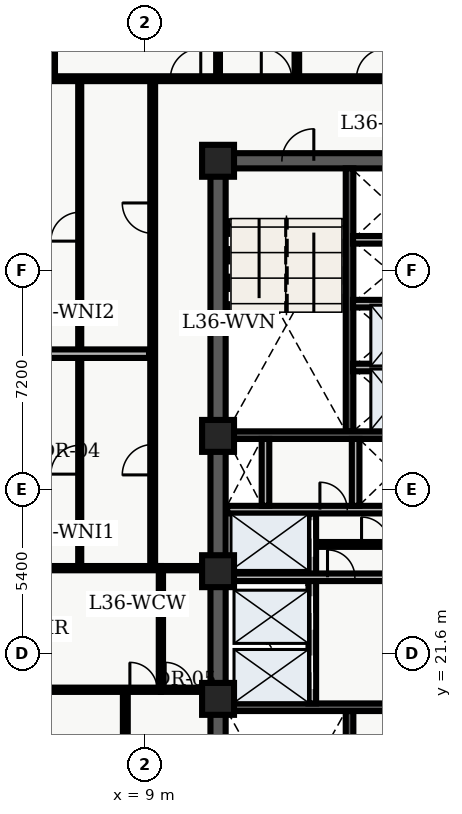
"""IFC4 building model, lengths in metres.
Left out: names, types, materials, properties, quantities, classifications, styles, units other than length and angle.
Written with IfcOpenShell. Run it as: python <this file> out.ifc"""

import sys

from ifc_helpers import new_model, entity, si_unit, converted_unit, direction, frame, origin_with_axes, origin_2d_with_axis, place, context, subcontext, project, spatial, polyline, rectangle, outline, extrude, element, fill, save


model = new_model("IFC4")
c1 = context("Model", 3, precision=1e-05, world=origin_with_axes(), true_north=direction((0.0, 1.0)))
c2 = subcontext(c1, "Body", "Model", "MODEL_VIEW")
j1 = project(units=[si_unit("LENGTHUNIT", "METRE"), converted_unit("PLANEANGLEUNIT", "DEGREE", entity("IfcPlaneAngleMeasure", 0.017), si_unit("PLANEANGLEUNIT", "RADIAN"), dimensions=[0, 0, 0, 0, 0, 0, 0])], contexts=[c1])
p1 = place(None, origin_with_axes())
s1 = spatial("IfcSite", under=j1, at=p1, CompositionType="ELEMENT")
p2 = place(p1, origin_with_axes())
s2 = spatial("IfcBuilding", under=s1, at=p2, CompositionType="ELEMENT")
p3 = place(p2, frame((0.0, 0.0, 148.5), z_axis=(0.0, 0.0, 1.0), x_axis=(1.0, 0.0, 0.0)))
s3 = spatial("IfcBuildingStorey", under=s2, at=p3, CompositionType="ELEMENT", Elevation=148.5)
p4 = place(p3, frame((11.4, 10.8, 0.0), z_axis=(0.0, 0.0, 1.0), x_axis=(0.0, 1.0, 0.0)))
e1 = element("IfcWall", 1, at=p4, inside=s3, PredefinedType="SHEAR", context=c2, shape_type="SweptSolid", body=[
    extrude(outline(polyline([(0.0, -0.25), (27.0, -0.25), (27.0, 0.25), (0.0, 0.25), (0.0, -0.25)])), origin_with_axes(), (0.0, 0.0, 1.0), 3.66),
])
p5 = place(p3, frame((11.4, 37.8, 0.0), z_axis=(0.0, 0.0, 1.0), x_axis=(1.0, 0.0, 0.0)))
e2 = element("IfcWall", 2, at=p5, inside=s3, PredefinedType="SHEAR", context=c2, shape_type="SweptSolid", body=[
    extrude(outline(polyline([(0.0, -0.25), (7.2, -0.25), (7.2, 0.25), (0.0, 0.25), (0.0, -0.25)])), origin_with_axes(), (0.0, 0.0, 1.0), 3.66),
])
p6 = place(p5, frame((2.625, 0.0, 0.0), z_axis=(0.0, 0.0, 1.0), x_axis=(1.0, 0.0, 0.0)))
e3 = element("IfcOpeningElement", 3, at=p6, cuts=e2, PredefinedType="OPENING", context=c2, shape_type="SweptSolid", body=[
    extrude(rectangle(XDim=1.05, YDim=0.52, at=origin_2d_with_axis()), origin_with_axes(), (0.0, 0.0, 1.0), 2.15),
])
p7 = place(p3, frame((15.725, 11.05, 0.0), z_axis=(0.0, 0.0, 1.0), x_axis=(0.0, 1.0, 0.0)))
e4 = element("IfcWall", 4, at=p7, inside=s3, PredefinedType="SHEAR", context=c2, shape_type="SweptSolid", body=[
    extrude(outline(polyline([(0.0, -0.125), (8.65, -0.125), (8.65, 0.125), (0.0, 0.125), (0.0, -0.125)])), origin_with_axes(), (0.0, 0.0, 1.0), 3.66),
])
p8 = place(p3, frame((11.65, 19.825, 0.0), z_axis=(0.0, 0.0, 1.0), x_axis=(1.0, 0.0, 0.0)))
e5 = element("IfcWall", 5, at=p8, inside=s3, PredefinedType="SHEAR", context=c2, shape_type="SweptSolid", body=[
    extrude(outline(polyline([(0.0, -0.125), (6.7, -0.125), (6.7, 0.125), (0.0, 0.125), (0.0, -0.125)])), origin_with_axes(), (0.0, 0.0, 1.0), 3.66),
])
p9 = place(p3, frame((15.725, 28.9, 0.0), z_axis=(0.0, 0.0, 1.0), x_axis=(0.0, 1.0, 0.0)))
e6 = element("IfcWall", 6, at=p9, inside=s3, PredefinedType="SHEAR", context=c2, shape_type="SweptSolid", body=[
    extrude(outline(polyline([(0.0, -0.125), (8.65, -0.125), (8.65, 0.125), (0.0, 0.125), (0.0, -0.125)])), origin_with_axes(), (0.0, 0.0, 1.0), 3.66),
])
p10 = place(p3, frame((11.65, 28.775, 0.0), z_axis=(0.0, 0.0, 1.0), x_axis=(1.0, 0.0, 0.0)))
e7 = element("IfcWall", 7, at=p10, inside=s3, PredefinedType="SHEAR", context=c2, shape_type="SweptSolid", body=[
    extrude(outline(polyline([(0.0, -0.125), (6.7, -0.125), (6.7, 0.125), (0.0, 0.125), (0.0, -0.125)])), origin_with_axes(), (0.0, 0.0, 1.0), 3.66),
])
p11 = place(p3, frame((14.5, 19.95, 0.0), z_axis=(0.0, 0.0, 1.0), x_axis=(0.0, 1.0, 0.0)))
e8 = element("IfcWall", 8, at=p11, inside=s3, PredefinedType="SOLIDWALL", context=c2, shape_type="SweptSolid", body=[
    extrude(outline(polyline([(0.0, -0.125), (6.25, -0.125), (6.25, 0.125), (0.0, 0.125), (0.0, -0.125)])), origin_with_axes(), (0.0, 0.0, 1.0), 2.7),
])
p12 = place(p11, frame((1.025, 0.0, 0.0), z_axis=(0.0, 0.0, 1.0), x_axis=(1.0, 0.0, 0.0)))
e9 = element("IfcOpeningElement", 9, at=p12, cuts=e8, PredefinedType="OPENING", context=c2, shape_type="SweptSolid", body=[
    extrude(rectangle(XDim=1.1, YDim=0.27, at=origin_2d_with_axis()), origin_with_axes(), (0.0, 0.0, 1.0), 2.15),
])
p13 = place(p11, frame((2.975, 0.0, 0.0), z_axis=(0.0, 0.0, 1.0), x_axis=(1.0, 0.0, 0.0)))
e10 = element("IfcOpeningElement", 10, at=p13, cuts=e8, PredefinedType="OPENING", context=c2, shape_type="SweptSolid", body=[
    extrude(rectangle(XDim=1.1, YDim=0.27, at=origin_2d_with_axis()), origin_with_axes(), (0.0, 0.0, 1.0), 2.15),
])
p14 = place(p11, frame((5.425, 0.0, 0.0), z_axis=(0.0, 0.0, 1.0), x_axis=(1.0, 0.0, 0.0)))
e11 = element("IfcOpeningElement", 11, at=p14, cuts=e8, PredefinedType="OPENING", context=c2, shape_type="SweptSolid", body=[
    extrude(rectangle(XDim=1.2, YDim=0.27, at=origin_2d_with_axis()), origin_with_axes(), (0.0, 0.0, 1.0), 2.15),
])
p15 = place(p3, frame((11.7, 24.1, 0.0), z_axis=(0.0, 0.0, 1.0), x_axis=(1.0, 0.0, 0.0)))
e12 = element("IfcWall", 12, at=p15, inside=s3, PredefinedType="SOLIDWALL", context=c2, shape_type="SweptSolid", body=[
    extrude(outline(polyline([(0.0, -0.125), (6.6, -0.125), (6.6, 0.125), (0.0, 0.125), (0.0, -0.125)])), origin_with_axes(), (0.0, 0.0, 1.0), 2.7),
])
p16 = place(p15, frame((3.75, 0.0, 0.0), z_axis=(0.0, 0.0, 1.0), x_axis=(1.0, 0.0, 0.0)))
e13 = element("IfcOpeningElement", 13, at=p16, cuts=e12, PredefinedType="OPENING", context=c2, shape_type="SweptSolid", body=[
    extrude(rectangle(XDim=0.9, YDim=0.27, at=origin_2d_with_axis()), origin_with_axes(), (0.0, 0.0, 1.0), 2.15),
])
p17 = place(p3, frame((11.7, 26.325, 0.0), z_axis=(0.0, 0.0, 1.0), x_axis=(1.0, 0.0, 0.0)))
e14 = element("IfcWall", 14, at=p17, inside=s3, PredefinedType="SOLIDWALL", context=c2, shape_type="SweptSolid", body=[
    extrude(outline(polyline([(0.0, -0.125), (6.6, -0.125), (6.6, 0.125), (0.0, 0.125), (0.0, -0.125)])), origin_with_axes(), (0.0, 0.0, 1.0), 2.7),
])
p18 = place(p17, frame((3.5, 0.0, 0.0), z_axis=(0.0, 0.0, 1.0), x_axis=(1.0, 0.0, 0.0)))
e15 = element("IfcOpeningElement", 15, at=p18, cuts=e14, PredefinedType="OPENING", context=c2, shape_type="SweptSolid", body=[
    extrude(rectangle(XDim=0.9, YDim=0.27, at=origin_2d_with_axis()), origin_with_axes(), (0.0, 0.0, 1.0), 2.15),
])
for number, where, z_axis, x_axis in (
    (16, (12.96, 26.45, 0.0), (0.0, 0.0, 1.0), (0.0, 1.0, 0.0)),
    (17, (15.925, 26.45, 0.0), (0.0, 0.0, 1.0), (0.0, 1.0, 0.0)),
):
    element("IfcWall", number, at=place(p3, frame(where, z_axis=z_axis, x_axis=x_axis)), inside=s3, PredefinedType="SOLIDWALL", context=c2, shape_type="SweptSolid", body=[
        extrude(outline(polyline([(0.0, -0.125), (2.2, -0.125), (2.2, 0.125), (0.0, 0.125), (0.0, -0.125)])), origin_with_axes(), (0.0, 0.0, 1.0), 2.7),
    ])
for number, where, z_axis, x_axis in (
    (18, (11.4, 20.1, 0.0), (0.0, 0.0, 1.0), (1.0, 0.0, 0.0)),
    (19, (11.4, 24.3, 0.0), (0.0, 0.0, 1.0), (1.0, 0.0, 0.0)),
    (20, (11.4, 28.75, 0.0), (0.0, 0.0, 1.0), (1.0, 0.0, 0.0)),
    (21, (11.4, 37.8, 0.0), (0.0, 0.0, 1.0), (1.0, 0.0, 0.0)),
):
    element("IfcColumn", number, at=place(p3, frame(where, z_axis=z_axis, x_axis=x_axis)), inside=s3, PredefinedType="COLUMN", context=c2, shape_type="SweptSolid", body=[
        extrude(rectangle(XDim=1.05, YDim=1.05, at=origin_2d_with_axis()), origin_with_axes(), (0.0, 0.0, 1.0), 3.9),
    ])
p19 = place(p3, frame((14.62, 25.18, 0.0), z_axis=(0.0, 0.0, 1.0), x_axis=(1.0, 0.0, 0.0)))
e22 = element("IfcWall", 22, at=p19, inside=s3, PredefinedType="PARTITIONING", context=c2, shape_type="SweptSolid", body=[
    extrude(outline(polyline([(0.0, -0.08), (3.68, -0.08), (3.68, 0.08), (0.0, 0.08), (0.0, -0.08)])), origin_with_axes(), (0.0, 0.0, 1.0), 2.7),
])
p20 = place(p19, frame((1.95, 0.0, 0.0), z_axis=(0.0, 0.0, 1.0), x_axis=(1.0, 0.0, 0.0)))
e23 = element("IfcOpeningElement", 23, at=p20, cuts=e22, PredefinedType="OPENING", context=c2, shape_type="SweptSolid", body=[
    extrude(rectangle(XDim=0.9, YDim=0.18, at=origin_2d_with_axis()), origin_with_axes(), (0.0, 0.0, 1.0), 2.15),
])
for number, where, z_axis, x_axis in (
    (24, (15.84, 31.0, 0.0), (0.0, 0.0, 1.0), (1.0, 0.0, 0.0)),
    (25, (15.84, 33.1, 0.0), (0.0, 0.0, 1.0), (1.0, 0.0, 0.0)),
    (26, (15.84, 35.2, 0.0), (0.0, 0.0, 1.0), (1.0, 0.0, 0.0)),
):
    element("IfcWall", number, at=place(p3, frame(where, z_axis=z_axis, x_axis=x_axis)), inside=s3, PredefinedType="SOLIDWALL", context=c2, shape_type="SweptSolid", body=[
        extrude(outline(polyline([(0.0, -0.125), (2.46, -0.125), (2.46, 0.125), (0.0, 0.125), (0.0, -0.125)])), origin_with_axes(), (0.0, 0.0, 1.0), 2.7),
    ])
p21 = place(p3, frame((9.52, 20.4, 0.0), z_axis=(0.0, 0.0, 1.0), x_axis=(0.0, 1.0, 0.0)))
e27 = element("IfcWall", 27, at=p21, inside=s3, PredefinedType="PARTITIONING", context=c2, shape_type="SweptSolid", body=[
    extrude(outline(polyline([(0.0, -0.07), (4.0, -0.07), (4.0, 0.07), (0.0, 0.07), (0.0, -0.07)])), origin_with_axes(), (0.0, 0.0, 1.0), 2.7),
])
p22 = place(p3, frame((9.52, 20.4, 0.0), z_axis=(0.0, 0.0, 1.0), x_axis=(1.0, 0.0, 0.0)))
e28 = element("IfcWall", 28, at=p22, inside=s3, PredefinedType="PARTITIONING", context=c2, shape_type="SweptSolid", body=[
    extrude(outline(polyline([(0.0, -0.07), (1.58, -0.07), (1.58, 0.07), (0.0, 0.07), (0.0, -0.07)])), origin_with_axes(), (0.0, 0.0, 1.0), 2.7),
])
p23 = place(p22, frame((0.59, 0.0, 0.0), z_axis=(0.0, 0.0, 1.0), x_axis=(1.0, 0.0, 0.0)))
e29 = element("IfcOpeningElement", 29, at=p23, cuts=e28, PredefinedType="OPENING", context=c2, shape_type="SweptSolid", body=[
    extrude(rectangle(XDim=0.9, YDim=0.16, at=origin_2d_with_axis()), origin_with_axes(), (0.0, 0.0, 1.0), 2.15),
])
p24 = place(p3, frame((9.52, 24.4, 0.0), z_axis=(0.0, 0.0, 1.0), x_axis=(1.0, 0.0, 0.0)))
e30 = element("IfcWall", 30, at=p24, inside=s3, PredefinedType="PARTITIONING", context=c2, shape_type="SweptSolid", body=[
    extrude(outline(polyline([(0.0, -0.07), (1.58, -0.07), (1.58, 0.07), (0.0, 0.07), (0.0, -0.07)])), origin_with_axes(), (0.0, 0.0, 1.0), 2.7),
])
p25 = place(p3, frame((2.6, 40.5, 0.0), z_axis=(0.0, 0.0, 1.0), x_axis=(1.0, 0.0, 0.0)))
e31 = element("IfcWall", 31, at=p25, inside=s3, PredefinedType="PARTITIONING", context=c2, shape_type="SweptSolid", body=[
    extrude(outline(polyline([(0.0, -0.08), (19.506, -0.08), (19.506, 0.08), (0.0, 0.08), (0.0, -0.08)])), origin_with_axes(), (0.0, 0.0, 1.0), 2.7),
])
p26 = place(p25, frame((1.675, 0.0, 0.0), z_axis=(0.0, 0.0, 1.0), x_axis=(1.0, 0.0, 0.0)))
e32 = element("IfcOpeningElement", 32, at=p26, cuts=e31, PredefinedType="OPENING", context=c2, shape_type="SweptSolid", body=[
    extrude(rectangle(XDim=1.0, YDim=0.18, at=origin_2d_with_axis()), origin_with_axes(), (0.0, 0.0, 1.0), 2.15),
])
p27 = place(p25, frame((7.731, 0.0, 0.0), z_axis=(0.0, 0.0, 1.0), x_axis=(1.0, 0.0, 0.0)))
e33 = element("IfcOpeningElement", 33, at=p27, cuts=e31, PredefinedType="OPENING", context=c2, shape_type="SweptSolid", body=[
    extrude(rectangle(XDim=1.0, YDim=0.18, at=origin_2d_with_axis()), origin_with_axes(), (0.0, 0.0, 1.0), 2.15),
])
p28 = place(p25, frame((10.722, 0.0, 0.0), z_axis=(0.0, 0.0, 1.0), x_axis=(1.0, 0.0, 0.0)))
e34 = element("IfcOpeningElement", 34, at=p28, cuts=e31, PredefinedType="OPENING", context=c2, shape_type="SweptSolid", body=[
    extrude(rectangle(XDim=1.0, YDim=0.18, at=origin_2d_with_axis()), origin_with_axes(), (0.0, 0.0, 1.0), 2.15),
])
p29 = place(p25, frame((13.851, 0.0, 0.0), z_axis=(0.0, 0.0, 1.0), x_axis=(1.0, 0.0, 0.0)))
e35 = element("IfcOpeningElement", 35, at=p29, cuts=e31, PredefinedType="OPENING", context=c2, shape_type="SweptSolid", body=[
    extrude(rectangle(XDim=1.0, YDim=0.18, at=origin_2d_with_axis()), origin_with_axes(), (0.0, 0.0, 1.0), 2.15),
])
p30 = place(p3, frame((8.35, 7.8, 0.0), z_axis=(0.0, 0.0, 1.0), x_axis=(0.0, 1.0, 0.0)))
e36 = element("IfcWall", 36, at=p30, inside=s3, PredefinedType="PARTITIONING", context=c2, shape_type="SweptSolid", body=[
    extrude(outline(polyline([(0.0, -0.08), (12.6, -0.08), (12.6, 0.08), (0.0, 0.08), (0.0, -0.08)])), origin_with_axes(), (0.0, 0.0, 1.0), 2.7),
])
p31 = place(p30, frame((2.893, 0.0, 0.0), z_axis=(0.0, 0.0, 1.0), x_axis=(1.0, 0.0, 0.0)))
e37 = element("IfcOpeningElement", 37, at=p31, cuts=e36, PredefinedType="OPENING", context=c2, shape_type="SweptSolid", body=[
    extrude(rectangle(XDim=1.0, YDim=0.18, at=origin_2d_with_axis()), origin_with_axes(), (0.0, 0.0, 1.0), 2.15),
])
p32 = place(p30, frame((9.088, 0.0, 0.0), z_axis=(0.0, 0.0, 1.0), x_axis=(1.0, 0.0, 0.0)))
e38 = element("IfcOpeningElement", 38, at=p32, cuts=e36, PredefinedType="OPENING", context=c2, shape_type="SweptSolid", body=[
    extrude(rectangle(XDim=1.0, YDim=0.18, at=origin_2d_with_axis()), origin_with_axes(), (0.0, 0.0, 1.0), 2.15),
])
p33 = place(p3, frame((9.25, 24.4, 0.0), z_axis=(0.0, 0.0, 1.0), x_axis=(0.0, 1.0, 0.0)))
e39 = element("IfcWall", 39, at=p33, inside=s3, PredefinedType="PARTITIONING", context=c2, shape_type="SweptSolid", body=[
    extrude(outline(polyline([(0.0, -0.08), (16.1, -0.08), (16.1, 0.08), (0.0, 0.08), (0.0, -0.08)])), origin_with_axes(), (0.0, 0.0, 1.0), 2.7),
])
p34 = place(p33, frame((3.567, 0.0, 0.0), z_axis=(0.0, 0.0, 1.0), x_axis=(1.0, 0.0, 0.0)))
e40 = element("IfcOpeningElement", 40, at=p34, cuts=e39, PredefinedType="OPENING", context=c2, shape_type="SweptSolid", body=[
    extrude(rectangle(XDim=1.0, YDim=0.18, at=origin_2d_with_axis()), origin_with_axes(), (0.0, 0.0, 1.0), 2.15),
])
p35 = place(p33, frame((11.512, 0.0, 0.0), z_axis=(0.0, 0.0, 1.0), x_axis=(1.0, 0.0, 0.0)))
e41 = element("IfcOpeningElement", 41, at=p35, cuts=e39, PredefinedType="OPENING", context=c2, shape_type="SweptSolid", body=[
    extrude(rectangle(XDim=1.0, YDim=0.18, at=origin_2d_with_axis()), origin_with_axes(), (0.0, 0.0, 1.0), 2.15),
])
p36 = place(p3, frame((0.335, 20.4, 0.0), z_axis=(0.0, 0.0, 1.0), x_axis=(1.0, 0.0, 0.0)))
e42 = element("IfcWall", 42, at=p36, inside=s3, PredefinedType="PARTITIONING", context=c2, shape_type="SweptSolid", body=[
    extrude(outline(polyline([(0.0, -0.07), (9.185, -0.07), (9.185, 0.07), (0.0, 0.07), (0.0, -0.07)])), origin_with_axes(), (0.0, 0.0, 1.0), 2.7),
])
p37 = place(p36, frame((8.615, 0.0, 0.0), z_axis=(0.0, 0.0, 1.0), x_axis=(1.0, 0.0, 0.0)))
e43 = element("IfcOpeningElement", 43, at=p37, cuts=e42, PredefinedType="OPENING", context=c2, shape_type="SweptSolid", body=[
    extrude(rectangle(XDim=0.9, YDim=0.16, at=origin_2d_with_axis()), origin_with_axes(), (0.0, 0.0, 1.0), 2.15),
])
p38 = place(p3, frame((0.335, 24.4, 0.0), z_axis=(0.0, 0.0, 1.0), x_axis=(1.0, 0.0, 0.0)))
e44 = element("IfcWall", 44, at=p38, inside=s3, PredefinedType="PARTITIONING", context=c2, shape_type="SweptSolid", body=[
    extrude(outline(polyline([(0.0, -0.07), (9.185, -0.07), (9.185, 0.07), (0.0, 0.07), (0.0, -0.07)])), origin_with_axes(), (0.0, 0.0, 1.0), 2.7),
])
p39 = place(p3, frame((6.85, 24.55, 0.0), z_axis=(0.0, 0.0, 1.0), x_axis=(0.0, 1.0, 0.0)))
e45 = element("IfcWall", 45, at=p39, inside=s3, PredefinedType="PARTITIONING", context=c2, shape_type="SweptSolid", body=[
    extrude(outline(polyline([(0.0, -0.05), (15.75, -0.05), (15.75, 0.05), (0.0, 0.05), (0.0, -0.05)])), origin_with_axes(), (0.0, 0.0, 1.0), 2.7),
])
p40 = place(p39, frame((3.417, 0.0, 0.0), z_axis=(0.0, 0.0, 1.0), x_axis=(1.0, 0.0, 0.0)))
e46 = element("IfcOpeningElement", 46, at=p40, cuts=e45, PredefinedType="OPENING", context=c2, shape_type="SweptSolid", body=[
    extrude(rectangle(XDim=0.95, YDim=0.12, at=origin_2d_with_axis()), origin_with_axes(), (0.0, 0.0, 1.0), 2.15),
])
p41 = place(p39, frame((11.082, 0.0, 0.0), z_axis=(0.0, 0.0, 1.0), x_axis=(1.0, 0.0, 0.0)))
e47 = element("IfcOpeningElement", 47, at=p41, cuts=e45, PredefinedType="OPENING", context=c2, shape_type="SweptSolid", body=[
    extrude(rectangle(XDim=0.95, YDim=0.12, at=origin_2d_with_axis()), origin_with_axes(), (0.0, 0.0, 1.0), 2.15),
])
p42 = place(p3, frame((0.335, 31.455, 0.0), z_axis=(0.0, 0.0, 1.0), x_axis=(1.0, 0.0, 0.0)))
e48 = element("IfcWall", 48, at=p42, inside=s3, PredefinedType="PARTITIONING", context=c2, shape_type="SweptSolid", body=[
    extrude(outline(polyline([(0.0, -0.14), (8.795, -0.14), (8.795, 0.14), (0.0, 0.14), (0.0, -0.14)])), origin_with_axes(), (0.0, 0.0, 1.0), 2.7),
])
p43 = place(p3, frame((5.961, 40.6, 0.0), z_axis=(0.0, 0.0, 1.0), x_axis=(0.0, 1.0, 0.0)))
e49 = element("IfcWall", 49, at=p43, inside=s3, PredefinedType="PARTITIONING", context=c2, shape_type="SweptSolid", body=[
    extrude(outline(polyline([(0.0, -0.075), (7.665, -0.075), (7.665, 0.075), (0.0, 0.075), (0.0, -0.075)])), origin_with_axes(), (0.0, 0.0, 1.0), 2.7),
])
p44 = place(p3, frame((11.4, 40.6, 0.0), z_axis=(0.0, 0.0, 1.0), x_axis=(0.0, 1.0, 0.0)))
e50 = element("IfcWall", 50, at=p44, inside=s3, PredefinedType="PARTITIONING", context=c2, shape_type="SweptSolid", body=[
    extrude(outline(polyline([(0.0, -0.062), (7.665, -0.062), (7.665, 0.062), (0.0, 0.062), (0.0, -0.062)])), origin_with_axes(), (0.0, 0.0, 1.0), 2.7),
])
p45 = place(p3, frame((13.992, 40.6, 0.0), z_axis=(0.0, 0.0, 1.0), x_axis=(0.0, 1.0, 0.0)))
e51 = element("IfcWall", 51, at=p45, inside=s3, PredefinedType="PARTITIONING", context=c2, shape_type="SweptSolid", body=[
    extrude(outline(polyline([(0.0, -0.075), (7.665, -0.075), (7.665, 0.075), (0.0, 0.075), (0.0, -0.075)])), origin_with_axes(), (0.0, 0.0, 1.0), 2.7),
])
p46 = place(p11, frame((1.025, 0.0, 0.0), z_axis=(0.0, 0.0, 1.0), x_axis=(1.0, 0.0, 0.0)))
e52 = element("IfcDoor", 52, at=p46, inside=s3, OperationType="SLIDING_TO_LEFT", PredefinedType="DOOR", context=c2, shape_type="SweptSolid", body=[
    extrude(rectangle(XDim=1.1, YDim=0.09, at=origin_2d_with_axis()), origin_with_axes(), (0.0, 0.0, 1.0), 2.15),
])
fill(e9, e52)
p47 = place(p11, frame((2.975, 0.0, 0.0), z_axis=(0.0, 0.0, 1.0), x_axis=(1.0, 0.0, 0.0)))
e53 = element("IfcDoor", 53, at=p47, inside=s3, OperationType="SLIDING_TO_RIGHT", PredefinedType="DOOR", context=c2, shape_type="SweptSolid", body=[
    extrude(rectangle(XDim=1.1, YDim=0.09, at=origin_2d_with_axis()), origin_with_axes(), (0.0, 0.0, 1.0), 2.15),
])
fill(e10, e53)
p48 = place(p11, frame((5.425, 0.0, 0.0), z_axis=(0.0, 0.0, 1.0), x_axis=(1.0, 0.0, 0.0)))
e54 = element("IfcDoor", 54, at=p48, inside=s3, OperationType="DOUBLE_DOOR_SLIDING", PredefinedType="DOOR", context=c2, shape_type="SweptSolid", body=[
    extrude(rectangle(XDim=1.2, YDim=0.09, at=origin_2d_with_axis()), origin_with_axes(), (0.0, 0.0, 1.0), 2.15),
])
fill(e11, e54)
p49 = place(p5, frame((2.625, 0.0, 0.0), z_axis=(0.0, 0.0, 1.0), x_axis=(1.0, 0.0, 0.0)))
e55 = element("IfcDoor", 55, at=p49, inside=s3, OperationType="SINGLE_SWING_RIGHT", PredefinedType="DOOR", context=c2, shape_type="SweptSolid", body=[
    extrude(rectangle(XDim=1.05, YDim=0.09, at=origin_2d_with_axis()), origin_with_axes(), (0.0, 0.0, 1.0), 2.15),
])
fill(e3, e55)
p50 = place(p17, frame((3.5, 0.0, 0.0), z_axis=(0.0, 0.0, 1.0), x_axis=(1.0, 0.0, 0.0)))
e56 = element("IfcDoor", 56, at=p50, inside=s3, OperationType="SINGLE_SWING_LEFT", PredefinedType="DOOR", context=c2, shape_type="SweptSolid", body=[
    extrude(rectangle(XDim=0.9, YDim=0.09, at=origin_2d_with_axis()), origin_with_axes(), (0.0, 0.0, 1.0), 2.15),
])
fill(e15, e56)
p51 = place(p15, frame((3.75, 0.0, 0.0), z_axis=(0.0, 0.0, 1.0), x_axis=(1.0, 0.0, 0.0)))
e57 = element("IfcDoor", 57, at=p51, inside=s3, OperationType="SINGLE_SWING_LEFT", PredefinedType="DOOR", context=c2, shape_type="SweptSolid", body=[
    extrude(rectangle(XDim=0.9, YDim=0.09, at=origin_2d_with_axis()), origin_with_axes(), (0.0, 0.0, 1.0), 2.15),
])
fill(e13, e57)
p52 = place(p19, frame((1.95, 0.0, 0.0), z_axis=(0.0, 0.0, 1.0), x_axis=(1.0, 0.0, 0.0)))
e58 = element("IfcDoor", 58, at=p52, inside=s3, OperationType="SINGLE_SWING_LEFT", PredefinedType="DOOR", context=c2, shape_type="SweptSolid", body=[
    extrude(rectangle(XDim=0.9, YDim=0.09, at=origin_2d_with_axis()), origin_with_axes(), (0.0, 0.0, 1.0), 2.15),
])
fill(e23, e58)
p53 = place(p22, frame((0.59, 0.0, 0.0), z_axis=(0.0, 0.0, 1.0), x_axis=(1.0, 0.0, 0.0)))
e59 = element("IfcDoor", 59, at=p53, inside=s3, OperationType="SINGLE_SWING_LEFT", PredefinedType="DOOR", context=c2, shape_type="SweptSolid", body=[
    extrude(rectangle(XDim=0.9, YDim=0.084, at=origin_2d_with_axis()), origin_with_axes(), (0.0, 0.0, 1.0), 2.15),
])
fill(e29, e59)
p54 = place(p36, frame((8.615, 0.0, 0.0), z_axis=(0.0, 0.0, 1.0), x_axis=(1.0, 0.0, 0.0)))
e60 = element("IfcDoor", 60, at=p54, inside=s3, OperationType="SINGLE_SWING_LEFT", PredefinedType="DOOR", context=c2, shape_type="SweptSolid", body=[
    extrude(rectangle(XDim=0.9, YDim=0.084, at=origin_2d_with_axis()), origin_with_axes(), (0.0, 0.0, 1.0), 2.15),
])
fill(e43, e60)
p55 = place(p39, frame((3.417, 0.0, 0.0), z_axis=(0.0, 0.0, 1.0), x_axis=(1.0, 0.0, 0.0)))
e61 = element("IfcDoor", 61, at=p55, inside=s3, OperationType="SINGLE_SWING_LEFT", PredefinedType="DOOR", context=c2, shape_type="SweptSolid", body=[
    extrude(rectangle(XDim=0.95, YDim=0.06, at=origin_2d_with_axis()), origin_with_axes(), (0.0, 0.0, 1.0), 2.15),
])
fill(e46, e61)
p56 = place(p33, frame((3.567, 0.0, 0.0), z_axis=(0.0, 0.0, 1.0), x_axis=(1.0, 0.0, 0.0)))
e62 = element("IfcDoor", 62, at=p56, inside=s3, OperationType="SINGLE_SWING_LEFT", PredefinedType="DOOR", context=c2, shape_type="SweptSolid", body=[
    extrude(rectangle(XDim=1.0, YDim=0.09, at=origin_2d_with_axis()), origin_with_axes(), (0.0, 0.0, 1.0), 2.15),
])
fill(e40, e62)
p57 = place(p39, frame((11.082, 0.0, 0.0), z_axis=(0.0, 0.0, 1.0), x_axis=(1.0, 0.0, 0.0)))
e63 = element("IfcDoor", 63, at=p57, inside=s3, OperationType="SINGLE_SWING_LEFT", PredefinedType="DOOR", context=c2, shape_type="SweptSolid", body=[
    extrude(rectangle(XDim=0.95, YDim=0.06, at=origin_2d_with_axis()), origin_with_axes(), (0.0, 0.0, 1.0), 2.15),
])
fill(e47, e63)
p58 = place(p33, frame((11.512, 0.0, 0.0), z_axis=(0.0, 0.0, 1.0), x_axis=(1.0, 0.0, 0.0)))
e64 = element("IfcDoor", 64, at=p58, inside=s3, OperationType="SINGLE_SWING_RIGHT", PredefinedType="DOOR", context=c2, shape_type="SweptSolid", body=[
    extrude(rectangle(XDim=1.0, YDim=0.09, at=origin_2d_with_axis()), origin_with_axes(), (0.0, 0.0, 1.0), 2.15),
])
fill(e41, e64)
p59 = place(p25, frame((7.731, 0.0, 0.0), z_axis=(0.0, 0.0, 1.0), x_axis=(1.0, 0.0, 0.0)))
e65 = element("IfcDoor", 65, at=p59, inside=s3, OperationType="SINGLE_SWING_RIGHT", PredefinedType="DOOR", context=c2, shape_type="SweptSolid", body=[
    extrude(rectangle(XDim=1.0, YDim=0.09, at=origin_2d_with_axis()), origin_with_axes(), (0.0, 0.0, 1.0), 2.15),
])
fill(e33, e65)
p60 = place(p25, frame((10.722, 0.0, 0.0), z_axis=(0.0, 0.0, 1.0), x_axis=(1.0, 0.0, 0.0)))
e66 = element("IfcDoor", 66, at=p60, inside=s3, OperationType="SINGLE_SWING_LEFT", PredefinedType="DOOR", context=c2, shape_type="SweptSolid", body=[
    extrude(rectangle(XDim=1.0, YDim=0.09, at=origin_2d_with_axis()), origin_with_axes(), (0.0, 0.0, 1.0), 2.15),
])
fill(e34, e66)
p61 = place(p25, frame((13.851, 0.0, 0.0), z_axis=(0.0, 0.0, 1.0), x_axis=(1.0, 0.0, 0.0)))
e67 = element("IfcDoor", 67, at=p61, inside=s3, OperationType="SINGLE_SWING_RIGHT", PredefinedType="DOOR", context=c2, shape_type="SweptSolid", body=[
    extrude(rectangle(XDim=1.0, YDim=0.09, at=origin_2d_with_axis()), origin_with_axes(), (0.0, 0.0, 1.0), 2.15),
])
fill(e35, e67)
save(model, sys.argv[1])
